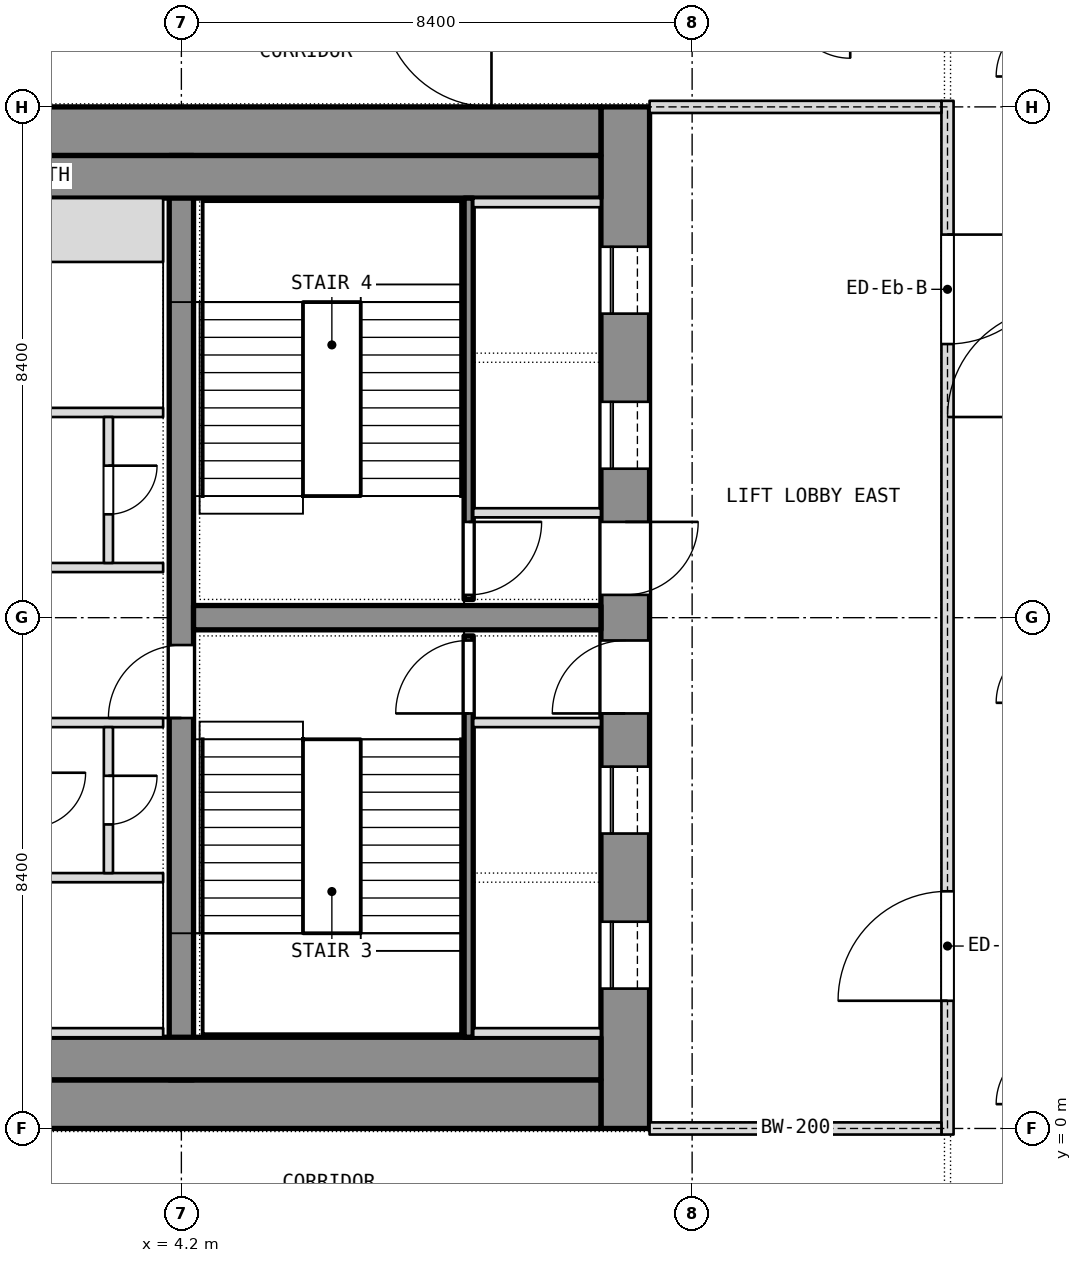
"""IFC4 building model, lengths in metres.
Left out: names, types, materials, properties, quantities, classifications, styles, units other than length and angle.
Written with IfcOpenShell. Run it as: python <this file> out.ifc"""

import sys

from ifc_helpers import new_model, si_unit, direction, frame, frame_2d, origin, place, context, subcontext, project, spatial, rectangle, extrude, element, fill, save


model = new_model("IFC4")
c1 = context("Model", 3, precision=1e-05, world=origin(), true_north=direction((0.0, 1.0)))
c2 = subcontext(c1, "Body", "Model", "MODEL_VIEW")
j1 = project(units=[si_unit("LENGTHUNIT", "METRE"), si_unit("PLANEANGLEUNIT", "RADIAN")], contexts=[c1])
p1 = place(None, origin())
s1 = spatial("IfcSite", under=j1, at=p1, CompositionType="ELEMENT")
p2 = place(p1, origin())
s2 = spatial("IfcBuilding", under=s1, at=p2, CompositionType="ELEMENT")
p3 = place(p2, frame((0.0, 0.0, 187.7)))
s3 = spatial("IfcBuildingStorey", under=s2, at=p3, CompositionType="ELEMENT", Elevation=187.7)
p4 = place(p3, frame((11.5, 0.0, 0.0), z_axis=(0.0, 0.0, 1.0), x_axis=(0.0, 1.0, 0.0)))
e1 = element("IfcWall", 1, at=p4, inside=s3, PredefinedType="SHEAR", context=c2, shape_type="SweptSolid", body=[
    extrude(rectangle(XDim=16.8, YDim=0.8, at=frame_2d((8.4, 0.0))), origin(), (0.0, 0.0, 1.0), 3.6),
])
p5 = place(p4, frame((2.3, 0.0, 0.0)))
e2 = element("IfcOpeningElement", 2, at=p5, cuts=e1, PredefinedType="OPENING", context=c2, shape_type="SweptSolid", body=[
    extrude(rectangle(XDim=1.1, YDim=2.1, at=frame_2d((0.55, 1.05))), frame((0.0, 0.4, 0.0), z_axis=(0.0, -1.0, 0.0), x_axis=(1.0, 0.0, 0.0)), (0.0, 0.0, 1.0), 0.8),
])
p6 = place(p4, frame((4.85, 0.0, 0.0)))
e3 = element("IfcOpeningElement", 3, at=p6, cuts=e1, PredefinedType="OPENING", context=c2, shape_type="SweptSolid", body=[
    extrude(rectangle(XDim=1.1, YDim=2.1, at=frame_2d((0.55, 1.05))), frame((0.0, 0.4, 0.0), z_axis=(0.0, -1.0, 0.0), x_axis=(1.0, 0.0, 0.0)), (0.0, 0.0, 1.0), 0.8),
])
p7 = place(p4, frame((6.825, 0.0, 0.0)))
e4 = element("IfcOpeningElement", 4, at=p7, cuts=e1, PredefinedType="OPENING", context=c2, shape_type="SweptSolid", body=[
    extrude(rectangle(XDim=1.2, YDim=2.1, at=frame_2d((0.6, 1.05))), frame((0.0, 0.4, 0.0), z_axis=(0.0, -1.0, 0.0), x_axis=(1.0, 0.0, 0.0)), (0.0, 0.0, 1.0), 0.8),
])
p8 = place(p4, frame((13.4, 0.0, 0.0)))
e5 = element("IfcOpeningElement", 5, at=p8, cuts=e1, PredefinedType="OPENING", context=c2, shape_type="SweptSolid", body=[
    extrude(rectangle(XDim=1.1, YDim=2.1, at=frame_2d((0.55, 1.05))), frame((0.0, 0.4, 0.0), z_axis=(0.0, -1.0, 0.0), x_axis=(1.0, 0.0, 0.0)), (0.0, 0.0, 1.0), 0.8),
])
p9 = place(p4, frame((10.85, 0.0, 0.0)))
e6 = element("IfcOpeningElement", 6, at=p9, cuts=e1, PredefinedType="OPENING", context=c2, shape_type="SweptSolid", body=[
    extrude(rectangle(XDim=1.1, YDim=2.1, at=frame_2d((0.55, 1.05))), frame((0.0, 0.4, 0.0), z_axis=(0.0, -1.0, 0.0), x_axis=(1.0, 0.0, 0.0)), (0.0, 0.0, 1.0), 0.8),
])
p10 = place(p4, frame((8.775, 0.0, 0.0)))
e7 = element("IfcOpeningElement", 7, at=p10, cuts=e1, PredefinedType="OPENING", context=c2, shape_type="SweptSolid", body=[
    extrude(rectangle(XDim=1.2, YDim=2.1, at=frame_2d((0.6, 1.05))), frame((0.0, 0.4, 0.0), z_axis=(0.0, -1.0, 0.0), x_axis=(1.0, 0.0, 0.0)), (0.0, 0.0, 1.0), 0.8),
])
for number, where, z_axis, x_axis in (
    (8, (-11.1, 0.4, 0.0), (0.0, 0.0, 1.0), (1.0, 0.0, 0.0)),
    (9, (-11.1, 16.4, 0.0), (0.0, 0.0, 1.0), (1.0, 0.0, 0.0)),
):
    element("IfcWall", number, at=place(p3, frame(where, z_axis=z_axis, x_axis=x_axis)), inside=s3, PredefinedType="SHEAR", context=c2, shape_type="SweptSolid", body=[
        extrude(rectangle(XDim=22.2, YDim=0.8, at=frame_2d((11.1, 0.0))), origin(), (0.0, 0.0, 1.0), 3.6),
    ])
p11 = place(p3, frame((4.2, 0.8, 0.0), z_axis=(0.0, 0.0, 1.0), x_axis=(0.0, 1.0, 0.0)))
e10 = element("IfcWall", 10, at=p11, inside=s3, PredefinedType="SHEAR", context=c2, shape_type="SweptSolid", body=[
    extrude(rectangle(XDim=15.2, YDim=0.4, at=frame_2d((7.6, 0.0))), origin(), (0.0, 0.0, 1.0), 3.6),
])
p12 = place(p11, frame((5.95, 0.0, 0.0)))
e11 = element("IfcOpeningElement", 11, at=p12, cuts=e10, PredefinedType="OPENING", context=c2, shape_type="SweptSolid", body=[
    extrude(rectangle(XDim=1.2, YDim=2.1, at=frame_2d((0.6, 1.05))), frame((0.0, 0.2, 0.0), z_axis=(0.0, -1.0, 0.0), x_axis=(1.0, 0.0, 0.0)), (0.0, 0.0, 1.0), 0.4),
])
p13 = place(p3, frame((4.4, 8.4, 0.0), z_axis=(0.0, 0.0, 1.0), x_axis=(1.0, 0.0, 0.0)))
e12 = element("IfcWall", 12, at=p13, inside=s3, PredefinedType="SHEAR", context=c2, shape_type="SweptSolid", body=[
    extrude(rectangle(XDim=6.7, YDim=0.4, at=frame_2d((3.35, 0.0))), origin(), (0.0, 0.0, 1.0), 3.6),
])
for number, where, z_axis, x_axis in (
    (13, (-11.1, 1.15, 0.0), (0.0, 0.0, 1.0), (1.0, 0.0, 0.0)),
    (14, (-11.1, 15.65, 0.0), (0.0, 0.0, 1.0), (1.0, 0.0, 0.0)),
):
    element("IfcWall", number, at=place(p3, frame(where, z_axis=z_axis, x_axis=x_axis)), inside=s3, PredefinedType="PARTITIONING", context=c2, shape_type="SweptSolid", body=[
        extrude(rectangle(XDim=22.2, YDim=0.7, at=frame_2d((11.1, 0.0))), origin(), (0.0, 0.0, 1.0), 3.34),
    ])
p14 = place(p3, frame((8.925, 1.5, 0.0), z_axis=(0.0, 0.0, 1.0), x_axis=(0.0, 1.0, 0.0)))
e15 = element("IfcWall", 15, at=p14, inside=s3, PredefinedType="SHEAR", context=c2, shape_type="SweptSolid", body=[
    extrude(rectangle(XDim=6.6, YDim=0.15, at=frame_2d((3.3, 0.0))), origin(), (0.0, 0.0, 1.0), 3.34),
])
p15 = place(p14, frame((5.325, 0.0, 0.0)))
e16 = element("IfcOpeningElement", 16, at=p15, cuts=e15, PredefinedType="OPENING", context=c2, shape_type="SweptSolid", body=[
    extrude(rectangle(XDim=1.2, YDim=2.1, at=frame_2d((0.6, 1.05))), frame((0.0, 0.075, 0.0), z_axis=(0.0, -1.0, 0.0), x_axis=(1.0, 0.0, 0.0)), (0.0, 0.0, 1.0), 0.15),
])
for number, where, z_axis, x_axis in (
    (17, (9.0, 6.675, 0.0), (0.0, 0.0, 1.0), (1.0, 0.0, 0.0)),
    (18, (9.0, 1.575, 0.0), (0.0, 0.0, 1.0), (1.0, 0.0, 0.0)),
):
    element("IfcWall", number, at=place(p3, frame(where, z_axis=z_axis, x_axis=x_axis)), inside=s3, PredefinedType="SHEAR", context=c2, shape_type="SweptSolid", body=[
        extrude(rectangle(XDim=2.1, YDim=0.15, at=frame_2d((1.05, 0.0))), origin(), (0.0, 0.0, 1.0), 3.6),
    ])
p16 = place(p3, frame((8.925, 8.7, 0.0), z_axis=(0.0, 0.0, 1.0), x_axis=(0.0, 1.0, 0.0)))
e19 = element("IfcWall", 19, at=p16, inside=s3, PredefinedType="SHEAR", context=c2, shape_type="SweptSolid", body=[
    extrude(rectangle(XDim=6.6, YDim=0.15, at=frame_2d((3.3, 0.0))), origin(), (0.0, 0.0, 1.0), 3.34),
])
p17 = place(p16, frame((0.075, 0.0, 0.0)))
e20 = element("IfcOpeningElement", 20, at=p17, cuts=e19, PredefinedType="OPENING", context=c2, shape_type="SweptSolid", body=[
    extrude(rectangle(XDim=1.2, YDim=2.1, at=frame_2d((0.6, 1.05))), frame((0.0, 0.075, 0.0), z_axis=(0.0, -1.0, 0.0), x_axis=(1.0, 0.0, 0.0)), (0.0, 0.0, 1.0), 0.15),
])
for number, where, z_axis, x_axis in (
    (21, (9.0, 10.125, 0.0), (0.0, 0.0, 1.0), (1.0, 0.0, 0.0)),
    (22, (9.0, 15.225, 0.0), (0.0, 0.0, 1.0), (1.0, 0.0, 0.0)),
):
    element("IfcWall", number, at=place(p3, frame(where, z_axis=z_axis, x_axis=x_axis)), inside=s3, PredefinedType="SHEAR", context=c2, shape_type="SweptSolid", body=[
        extrude(rectangle(XDim=2.1, YDim=0.15, at=frame_2d((1.05, 0.0))), origin(), (0.0, 0.0, 1.0), 3.6),
    ])
p18 = place(p3, frame((-3.9, 4.125, 0.0), z_axis=(0.0, 0.0, 1.0), x_axis=(1.0, 0.0, 0.0)))
e23 = element("IfcWall", 23, at=p18, inside=s3, PredefinedType="PARTITIONING", context=c2, shape_type="SweptSolid", body=[
    extrude(rectangle(XDim=7.8, YDim=0.15, at=frame_2d((3.9, 0.0))), origin(), (0.0, 0.0, 1.0), 3.34),
])
p19 = place(p18, frame((3.75, 0.0, 0.0)))
e24 = element("IfcOpeningElement", 24, at=p19, cuts=e23, PredefinedType="OPENING", context=c2, shape_type="SweptSolid", body=[
    extrude(rectangle(XDim=1.2, YDim=2.1, at=frame_2d((0.6, 1.05))), frame((0.0, 0.075, 0.0), z_axis=(0.0, -1.0, 0.0), x_axis=(1.0, 0.0, 0.0)), (0.0, 0.0, 1.0), 0.15),
])
p20 = place(p3, frame((-3.9, 11.775, 0.0), z_axis=(0.0, 0.0, 1.0), x_axis=(1.0, 0.0, 0.0)))
e25 = element("IfcWall", 25, at=p20, inside=s3, PredefinedType="PARTITIONING", context=c2, shape_type="SweptSolid", body=[
    extrude(rectangle(XDim=7.8, YDim=0.15, at=frame_2d((3.9, 0.0))), origin(), (0.0, 0.0, 1.0), 3.34),
])
p21 = place(p20, frame((3.3, 0.0, 0.0)))
e26 = element("IfcOpeningElement", 26, at=p21, cuts=e25, PredefinedType="OPENING", context=c2, shape_type="SweptSolid", body=[
    extrude(rectangle(XDim=1.2, YDim=2.1, at=frame_2d((0.6, 1.05))), frame((0.0, 0.075, 0.0), z_axis=(0.0, -1.0, 0.0), x_axis=(1.0, 0.0, 0.0)), (0.0, 0.0, 1.0), 0.15),
])
p22 = place(p3, frame((1.65, 1.575, 0.0), z_axis=(0.0, 0.0, 1.0), x_axis=(1.0, 0.0, 0.0)))
e27 = element("IfcWall", 27, at=p22, inside=s3, PredefinedType="SHEAR", context=c2, shape_type="SweptSolid", body=[
    extrude(rectangle(XDim=2.25, YDim=0.15, at=frame_2d((1.125, 0.0))), origin(), (0.0, 0.0, 1.0), 3.6),
])
p23 = place(p3, frame((1.65, 14.775, 0.0), z_axis=(0.0, 0.0, 1.0), x_axis=(1.0, 0.0, 0.0)))
e28 = element("IfcWall", 28, at=p23, inside=s3, PredefinedType="SHEAR", context=c2, shape_type="SweptSolid", body=[
    extrude(rectangle(XDim=2.25, YDim=1.05, at=frame_2d((1.125, 0.0))), origin(), (0.0, 0.0, 1.0), 3.6),
])
for number, where, z_axis, x_axis in (
    (29, (1.65, 6.675, 0.0), (0.0, 0.0, 1.0), (1.0, 0.0, 0.0)),
    (30, (1.65, 9.225, 0.0), (0.0, 0.0, 1.0), (1.0, 0.0, 0.0)),
):
    element("IfcWall", number, at=place(p3, frame(where, z_axis=z_axis, x_axis=x_axis)), inside=s3, PredefinedType="PARTITIONING", context=c2, shape_type="SweptSolid", body=[
        extrude(rectangle(XDim=2.25, YDim=0.15, at=frame_2d((1.125, 0.0))), origin(), (0.0, 0.0, 1.0), 3.34),
    ])
p24 = place(p3, frame((3.0, 4.2, 0.0), z_axis=(0.0, 0.0, 1.0), x_axis=(0.0, 1.0, 0.0)))
e31 = element("IfcWall", 31, at=p24, inside=s3, PredefinedType="PARTITIONING", context=c2, shape_type="SweptSolid", body=[
    extrude(rectangle(XDim=2.4, YDim=0.15, at=frame_2d((1.2, 0.0))), origin(), (0.0, 0.0, 1.0), 3.34),
])
p25 = place(p24, frame((0.8, 0.0, 0.0)))
e32 = element("IfcOpeningElement", 32, at=p25, cuts=e31, PredefinedType="OPENING", context=c2, shape_type="SweptSolid", body=[
    extrude(rectangle(XDim=0.8, YDim=2.1, at=frame_2d((0.4, 1.05))), frame((0.0, 0.075, 0.0), z_axis=(0.0, -1.0, 0.0), x_axis=(1.0, 0.0, 0.0)), (0.0, 0.0, 1.0), 0.15),
])
p26 = place(p3, frame((3.0, 9.3, 0.0), z_axis=(0.0, 0.0, 1.0), x_axis=(0.0, 1.0, 0.0)))
e33 = element("IfcWall", 33, at=p26, inside=s3, PredefinedType="PARTITIONING", context=c2, shape_type="SweptSolid", body=[
    extrude(rectangle(XDim=2.4, YDim=0.15, at=frame_2d((1.2, 0.0))), origin(), (0.0, 0.0, 1.0), 3.34),
])
p27 = place(p26, frame((0.8, 0.0, 0.0)))
e34 = element("IfcOpeningElement", 34, at=p27, cuts=e33, PredefinedType="OPENING", context=c2, shape_type="SweptSolid", body=[
    extrude(rectangle(XDim=0.8, YDim=2.1, at=frame_2d((0.4, 1.05))), frame((0.0, 0.075, 0.0), z_axis=(0.0, -1.0, 0.0), x_axis=(1.0, 0.0, 0.0)), (0.0, 0.0, 1.0), 0.15),
])
p28 = place(p3, frame((16.8, -0.1, 0.0), z_axis=(0.0, 0.0, 1.0), x_axis=(0.0, 1.0, 0.0)))
e35 = element("IfcWall", 35, at=p28, inside=s3, PredefinedType="PARTITIONING", context=c2, shape_type="SweptSolid", body=[
    extrude(rectangle(XDim=17.0, YDim=0.2, at=frame_2d((8.5, 0.0))), origin(), (0.0, 0.0, 1.0), 3.34),
])
p29 = place(p28, frame((2.2, 0.0, 0.0)))
e36 = element("IfcOpeningElement", 36, at=p29, cuts=e35, PredefinedType="OPENING", context=c2, shape_type="SweptSolid", body=[
    extrude(rectangle(XDim=1.8, YDim=2.1, at=frame_2d((0.9, 1.05))), frame((0.0, 0.1, 0.0), z_axis=(0.0, -1.0, 0.0), x_axis=(1.0, 0.0, 0.0)), (0.0, 0.0, 1.0), 0.2),
])
p30 = place(p28, frame((13.0, 0.0, 0.0)))
e37 = element("IfcOpeningElement", 37, at=p30, cuts=e35, PredefinedType="OPENING", context=c2, shape_type="SweptSolid", body=[
    extrude(rectangle(XDim=1.8, YDim=2.1, at=frame_2d((0.9, 1.05))), frame((0.0, 0.1, 0.0), z_axis=(0.0, -1.0, 0.0), x_axis=(1.0, 0.0, 0.0)), (0.0, 0.0, 1.0), 0.2),
])
for number, where, z_axis, x_axis in (
    (38, (11.9, 0.0, 0.0), (0.0, 0.0, 1.0), (1.0, 0.0, 0.0)),
    (39, (11.9, 16.8, 0.0), (0.0, 0.0, 1.0), (1.0, 0.0, 0.0)),
):
    element("IfcWall", number, at=place(p3, frame(where, z_axis=z_axis, x_axis=x_axis)), inside=s3, PredefinedType="PARTITIONING", context=c2, shape_type="SweptSolid", body=[
        extrude(rectangle(XDim=4.8, YDim=0.2, at=frame_2d((2.4, 0.0))), origin(), (0.0, 0.0, 1.0), 2.94),
    ])
p31 = place(p5, origin())
e40 = element("IfcDoor", 40, at=p31, inside=s3, OperationType="SLIDING_TO_LEFT", PredefinedType="DOOR", context=c2, shape_type="SweptSolid", body=[
    extrude(rectangle(XDim=1.1, YDim=2.1, at=frame_2d((0.55, 1.05))), frame((0.0, 0.025, 0.0), z_axis=(0.0, -1.0, 0.0), x_axis=(1.0, 0.0, 0.0)), (0.0, 0.0, 1.0), 0.05),
])
fill(e2, e40)
p32 = place(p6, origin())
e41 = element("IfcDoor", 41, at=p32, inside=s3, OperationType="SLIDING_TO_LEFT", PredefinedType="DOOR", context=c2, shape_type="SweptSolid", body=[
    extrude(rectangle(XDim=1.1, YDim=2.1, at=frame_2d((0.55, 1.05))), frame((0.0, 0.025, 0.0), z_axis=(0.0, -1.0, 0.0), x_axis=(1.0, 0.0, 0.0)), (0.0, 0.0, 1.0), 0.05),
])
fill(e3, e41)
p33 = place(p7, origin())
e42 = element("IfcDoor", 42, at=p33, inside=s3, OperationType="SINGLE_SWING_LEFT", PredefinedType="DOOR", context=c2, shape_type="SweptSolid", body=[
    extrude(rectangle(XDim=1.2, YDim=2.1, at=frame_2d((0.6, 1.05))), frame((0.0, 0.025, 0.0), z_axis=(0.0, -1.0, 0.0), x_axis=(1.0, 0.0, 0.0)), (0.0, 0.0, 1.0), 0.05),
])
fill(e4, e42)
p34 = place(p15, origin())
e43 = element("IfcDoor", 43, at=p34, inside=s3, OperationType="SINGLE_SWING_LEFT", PredefinedType="DOOR", context=c2, shape_type="SweptSolid", body=[
    extrude(rectangle(XDim=1.2, YDim=2.1, at=frame_2d((0.6, 1.05))), frame((0.0, 0.025, 0.0), z_axis=(0.0, -1.0, 0.0), x_axis=(1.0, 0.0, 0.0)), (0.0, 0.0, 1.0), 0.05),
])
fill(e16, e43)
p35 = place(p8, origin())
e44 = element("IfcDoor", 44, at=p35, inside=s3, OperationType="SLIDING_TO_LEFT", PredefinedType="DOOR", context=c2, shape_type="SweptSolid", body=[
    extrude(rectangle(XDim=1.1, YDim=2.1, at=frame_2d((0.55, 1.05))), frame((0.0, 0.025, 0.0), z_axis=(0.0, -1.0, 0.0), x_axis=(1.0, 0.0, 0.0)), (0.0, 0.0, 1.0), 0.05),
])
fill(e5, e44)
p36 = place(p9, origin())
e45 = element("IfcDoor", 45, at=p36, inside=s3, OperationType="SLIDING_TO_LEFT", PredefinedType="DOOR", context=c2, shape_type="SweptSolid", body=[
    extrude(rectangle(XDim=1.1, YDim=2.1, at=frame_2d((0.55, 1.05))), frame((0.0, 0.025, 0.0), z_axis=(0.0, -1.0, 0.0), x_axis=(1.0, 0.0, 0.0)), (0.0, 0.0, 1.0), 0.05),
])
fill(e6, e45)
p37 = place(p10, origin())
e46 = element("IfcDoor", 46, at=p37, inside=s3, OperationType="SINGLE_SWING_LEFT", PredefinedType="DOOR", context=c2, shape_type="SweptSolid", body=[
    extrude(rectangle(XDim=1.2, YDim=2.1, at=frame_2d((0.6, 1.05))), frame((0.0, 0.025, 0.0), z_axis=(0.0, -1.0, 0.0), x_axis=(1.0, 0.0, 0.0)), (0.0, 0.0, 1.0), 0.05),
])
fill(e7, e46)
p38 = place(p17, origin())
e47 = element("IfcDoor", 47, at=p38, inside=s3, OperationType="SINGLE_SWING_LEFT", PredefinedType="DOOR", context=c2, shape_type="SweptSolid", body=[
    extrude(rectangle(XDim=1.2, YDim=2.1, at=frame_2d((0.6, 1.05))), frame((0.0, 0.025, 0.0), z_axis=(0.0, -1.0, 0.0), x_axis=(1.0, 0.0, 0.0)), (0.0, 0.0, 1.0), 0.05),
])
fill(e20, e47)
p39 = place(p25, origin())
e48 = element("IfcDoor", 48, at=p39, inside=s3, OperationType="SINGLE_SWING_LEFT", PredefinedType="DOOR", context=c2, shape_type="SweptSolid", body=[
    extrude(rectangle(XDim=0.8, YDim=2.1, at=frame_2d((0.4, 1.05))), frame((0.0, 0.025, 0.0), z_axis=(0.0, -1.0, 0.0), x_axis=(1.0, 0.0, 0.0)), (0.0, 0.0, 1.0), 0.05),
])
fill(e32, e48)
p40 = place(p27, origin())
e49 = element("IfcDoor", 49, at=p40, inside=s3, OperationType="SINGLE_SWING_LEFT", PredefinedType="DOOR", context=c2, shape_type="SweptSolid", body=[
    extrude(rectangle(XDim=0.8, YDim=2.1, at=frame_2d((0.4, 1.05))), frame((0.0, 0.025, 0.0), z_axis=(0.0, -1.0, 0.0), x_axis=(1.0, 0.0, 0.0)), (0.0, 0.0, 1.0), 0.05),
])
fill(e34, e49)
p41 = place(p12, origin())
e50 = element("IfcDoor", 50, at=p41, inside=s3, OperationType="SINGLE_SWING_LEFT", PredefinedType="DOOR", context=c2, shape_type="SweptSolid", body=[
    extrude(rectangle(XDim=1.2, YDim=2.1, at=frame_2d((0.6, 1.05))), frame((0.0, 0.025, 0.0), z_axis=(0.0, -1.0, 0.0), x_axis=(1.0, 0.0, 0.0)), (0.0, 0.0, 1.0), 0.05),
])
fill(e11, e50)
p42 = place(p29, origin())
e51 = element("IfcDoor", 51, at=p42, inside=s3, OperationType="DOUBLE_DOOR_SINGLE_SWING", PredefinedType="DOOR", context=c2, shape_type="SweptSolid", body=[
    extrude(rectangle(XDim=1.8, YDim=2.1, at=frame_2d((0.9, 1.05))), frame((0.0, 0.025, 0.0), z_axis=(0.0, -1.0, 0.0), x_axis=(1.0, 0.0, 0.0)), (0.0, 0.0, 1.0), 0.05),
])
fill(e36, e51)
p43 = place(p30, origin())
e52 = element("IfcDoor", 52, at=p43, inside=s3, OperationType="DOUBLE_DOOR_SINGLE_SWING", PredefinedType="DOOR", context=c2, shape_type="SweptSolid", body=[
    extrude(rectangle(XDim=1.8, YDim=2.1, at=frame_2d((0.9, 1.05))), frame((0.0, 0.025, 0.0), z_axis=(0.0, -1.0, 0.0), x_axis=(1.0, 0.0, 0.0)), (0.0, 0.0, 1.0), 0.05),
])
fill(e37, e52)
save(model, sys.argv[1])
